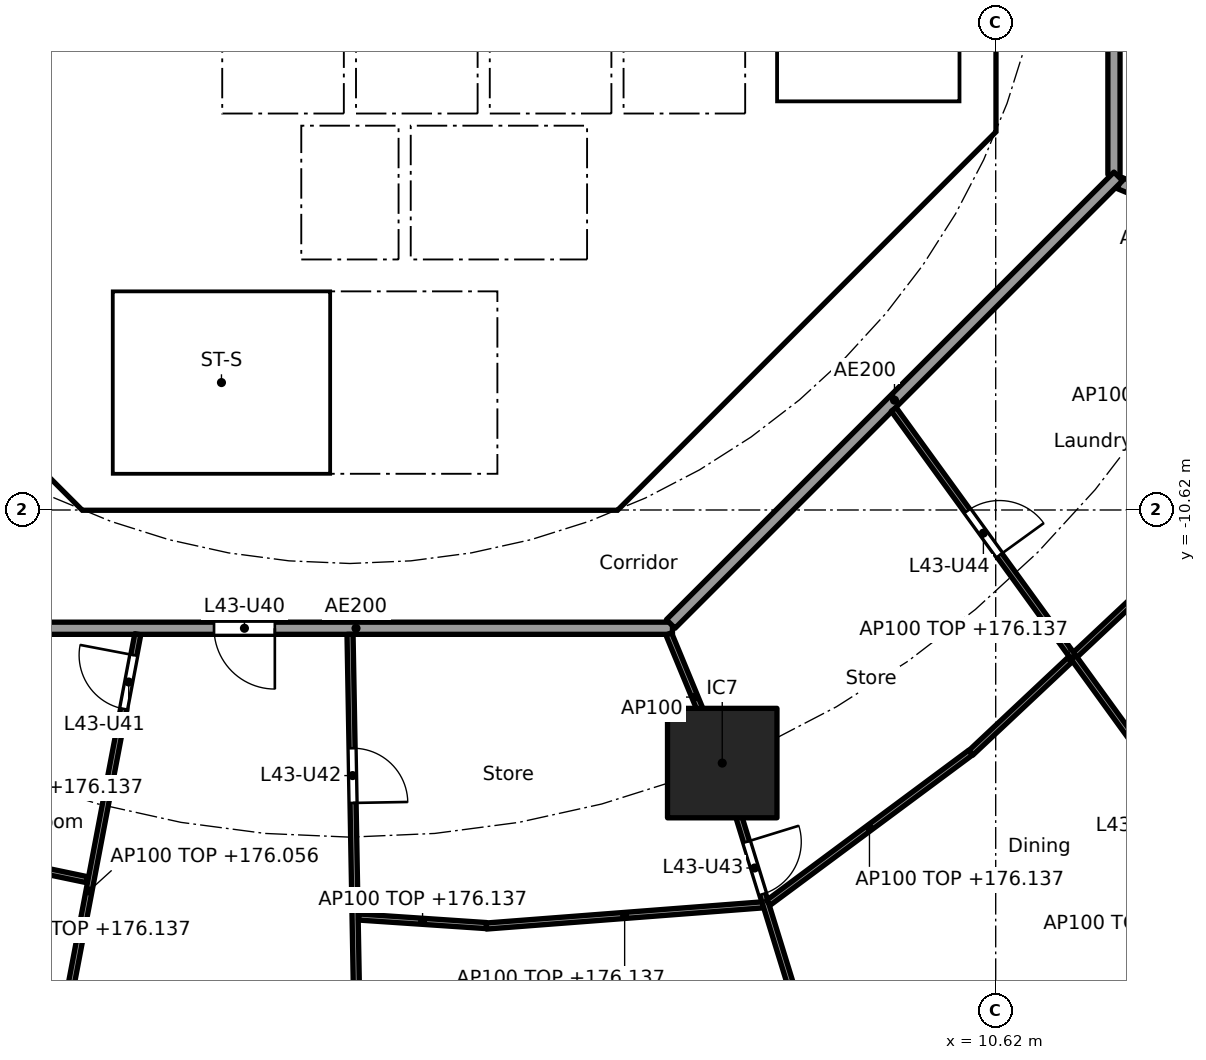
"""IFC4 building model, lengths in metres.
Left out: names, types, materials, properties, quantities, classifications, styles, units other than length and angle.
Written with IfcOpenShell. Run it as: python <this file> out.ifc"""

import sys

from ifc_helpers import new_model, si_unit, direction, frame, frame_2d, origin, origin_2d, place, context, subcontext, project, spatial, polyline, rectangle, outline, extrude, element, fill, save


model = new_model("IFC4")
c1 = context("Model", 3, precision=1e-05, world=origin(), true_north=direction((0.0, 1.0)))
c2 = subcontext(c1, "Body", "Model", "MODEL_VIEW")
j1 = project(units=[si_unit("LENGTHUNIT", "METRE"), si_unit("PLANEANGLEUNIT", "RADIAN")], contexts=[c1])
p1 = place(None, origin())
s1 = spatial("IfcSite", under=j1, at=p1, CompositionType="ELEMENT")
p2 = place(p1, origin())
s2 = spatial("IfcBuilding", under=s1, at=p2, CompositionType="ELEMENT")
p3 = place(p2, frame((0.0, 0.0, 173.3)))
s3 = spatial("IfcBuildingStorey", under=s2, at=p3, CompositionType="ELEMENT", Elevation=173.3)
p4 = place(p3, frame((6.123, -14.782, 0.0), z_axis=(0.0, 0.0, 1.0), x_axis=(1.0, 0.0, 0.0)))
e1 = element("IfcColumn", 1, at=p4, inside=s3, PredefinedType="COLUMN", context=c2, shape_type="SweptSolid", body=[
    extrude(rectangle(XDim=1.8, YDim=1.8, at=origin_2d()), origin(), (0.0, 0.0, 1.0), 3.7),
])
p5 = place(p3, frame((-9.988, -4.613, 0.0), z_axis=(0.0, 0.0, 1.0), x_axis=(0.707106781187, -0.707106781187, 0.0)))
e2 = element("IfcWall", 2, at=p5, inside=s3, PredefinedType="SHEAR", context=c2, shape_type="SweptSolid", body=[
    extrude(rectangle(XDim=7.602, YDim=0.6, at=frame_2d((3.801, 0.0))), origin(), (0.0, 0.0, 1.0), 3.44),
])
p6 = place(p5, frame((6.151, 0.0, 0.0)))
e3 = element("IfcOpeningElement", 3, at=p6, cuts=e2, PredefinedType="OPENING", context=c2, shape_type="SweptSolid", body=[
    extrude(rectangle(XDim=1.1, YDim=2.1, at=frame_2d((0.55, 1.05))), frame((0.0, 0.31, 0.0), z_axis=(0.0, -1.0, 0.0), x_axis=(1.0, 0.0, 0.0)), (0.0, 0.0, 1.0), 0.62),
])
p7 = place(p3, frame((4.613, -9.988, 0.0), z_axis=(0.0, 0.0, 1.0), x_axis=(0.707106781187, 0.707106781187, 0.0)))
e4 = element("IfcWall", 4, at=p7, inside=s3, PredefinedType="SHEAR", context=c2, shape_type="SweptSolid", body=[
    extrude(rectangle(XDim=7.602, YDim=0.6, at=frame_2d((3.801, 0.0))), origin(), (0.0, 0.0, 1.0), 3.44),
])
p8 = place(p7, frame((3.201, 0.0, 0.0)))
e5 = element("IfcOpeningElement", 5, at=p8, cuts=e4, PredefinedType="OPENING", context=c2, shape_type="SweptSolid", body=[
    extrude(rectangle(XDim=1.2, YDim=2.1, at=frame_2d((0.6, 1.05))), frame((0.0, 0.31, 0.0), z_axis=(0.0, -1.0, 0.0), x_axis=(1.0, 0.0, 0.0)), (0.0, 0.0, 1.0), 0.62),
])
p9 = place(p3, frame((4.0, -10.025, 0.0), z_axis=(0.0, 0.0, 1.0), x_axis=(0.0, 1.0, 0.0)))
e6 = element("IfcWall", 6, at=p9, inside=s3, PredefinedType="SOLIDWALL", context=c2, shape_type="SweptSolid", body=[
    extrude(rectangle(XDim=3.0, YDim=0.2, at=frame_2d((1.5, 0.0))), origin(), (0.0, 0.0, 1.0), 3.44),
])
p10 = place(p9, frame((0.975, 0.0, 0.0)))
e7 = element("IfcOpeningElement", 7, at=p10, cuts=e6, PredefinedType="OPENING", context=c2, shape_type="SweptSolid", body=[
    extrude(rectangle(XDim=1.1, YDim=2.1, at=frame_2d((0.55, 1.05))), frame((0.0, 0.11, 0.0), z_axis=(0.0, -1.0, 0.0), x_axis=(1.0, 0.0, 0.0)), (0.0, 0.0, 1.0), 0.22),
])
p11 = place(p3, frame((4.0, -6.5, 0.0), z_axis=(0.0, 0.0, 1.0), x_axis=(0.0, 1.0, 0.0)))
e8 = element("IfcWall", 8, at=p11, inside=s3, PredefinedType="SOLIDWALL", context=c2, shape_type="SweptSolid", body=[
    extrude(rectangle(XDim=2.2, YDim=0.2, at=frame_2d((1.1, 0.0))), origin(), (0.0, 0.0, 1.0), 3.44),
])
p12 = place(p11, frame((0.55, 0.0, 0.0)))
e9 = element("IfcOpeningElement", 9, at=p12, cuts=e8, PredefinedType="OPENING", context=c2, shape_type="SweptSolid", body=[
    extrude(rectangle(XDim=1.1, YDim=2.1, at=frame_2d((0.55, 1.05))), frame((0.0, 0.11, 0.0), z_axis=(0.0, -1.0, 0.0), x_axis=(1.0, 0.0, 0.0)), (0.0, 0.0, 1.0), 0.22),
])
p13 = place(p3, frame((-4.0, -6.5, 0.0), z_axis=(0.0, 0.0, 1.0), x_axis=(0.0, 1.0, 0.0)))
e10 = element("IfcWall", 10, at=p13, inside=s3, PredefinedType="SOLIDWALL", context=c2, shape_type="SweptSolid", body=[
    extrude(rectangle(XDim=2.2, YDim=0.2, at=frame_2d((1.1, 0.0))), origin(), (0.0, 0.0, 1.0), 3.44),
])
p14 = place(p13, frame((0.65, 0.0, 0.0)))
e11 = element("IfcOpeningElement", 11, at=p14, cuts=e10, PredefinedType="OPENING", context=c2, shape_type="SweptSolid", body=[
    extrude(rectangle(XDim=0.9, YDim=2.1, at=frame_2d((0.45, 1.05))), frame((0.0, 0.11, 0.0), z_axis=(0.0, -1.0, 0.0), x_axis=(1.0, 0.0, 0.0)), (0.0, 0.0, 1.0), 0.22),
])
p15 = place(p3, origin())
e12 = element("IfcWall", 12, at=p15, inside=s3, PredefinedType="SHEAR", context=c2, shape_type="SweptSolid", body=[
    extrude(outline(polyline([(-4.152, -10.025), (4.152, -10.025), (4.401, -9.776), (4.825, -10.2), (4.401, -10.625), (-4.401, -10.625), (-4.825, -10.2), (-4.401, -9.776), (-4.152, -10.025)])), origin(), (0.0, 0.0, 1.0), 3.44),
])
p16 = place(p3, origin())
e13 = element("IfcWall", 13, at=p16, inside=s3, PredefinedType="SHEAR", context=c2, shape_type="SweptSolid", body=[
    extrude(outline(polyline([(9.776, -4.401), (10.025, -4.152), (10.025, -3.801), (10.025, 4.152), (9.776, 4.401), (10.2, 4.825), (10.625, 4.401), (10.625, -4.401), (10.2, -4.825), (9.776, -4.401)])), origin(), (0.0, 0.0, 1.0), 3.44),
])
for number, where, z_axis, x_axis in (
    (14, (-0.9, -6.5, 0.0), (0.0, 0.0, 1.0), (0.0, 1.0, 0.0)),
    (15, (0.9, -6.5, 0.0), (0.0, 0.0, 1.0), (0.0, 1.0, 0.0)),
):
    element("IfcWall", number, at=place(p3, frame(where, z_axis=z_axis, x_axis=x_axis)), inside=s3, PredefinedType="SOLIDWALL", context=c2, shape_type="SweptSolid", body=[
        extrude(rectangle(XDim=2.2, YDim=0.2, at=frame_2d((1.1, 0.0))), origin(), (0.0, 0.0, 1.0), 3.44),
    ])
p17 = place(p3, origin())
e16 = element("IfcWall", 16, at=p17, inside=s3, PredefinedType="SOLIDWALL", context=c2, shape_type="SweptSolid", body=[
    extrude(outline(polyline([(-6.7, -2.1), (-6.5, -2.1), (-6.5, -4.1), (-2.3, -4.1), (-2.3, -2.1), (-2.1, -2.1), (-2.1, -4.1), (-0.1, -4.1), (-0.1, -2.1), (0.1, -2.1), (0.1, -4.1), (2.1, -4.1), (2.1, -2.1), (2.3, -2.1), (2.3, -4.1), (4.3, -4.1), (4.3, -2.1), (4.5, -2.1), (4.5, -4.1), (6.5, -4.1), (6.5, -2.1), (6.7, -2.1), (6.7, -4.3), (-6.7, -4.3), (-6.7, -2.1)])), origin(), (0.0, 0.0, 1.0), 3.44),
])
p18 = place(p3, origin())
e17 = element("IfcWall", 17, at=p18, inside=s3, PredefinedType="SOLIDWALL", context=c2, shape_type="SweptSolid", body=[
    extrude(outline(polyline([(-3.9, -10.025), (-4.1, -10.025), (-4.1, -7.025), (-3.9, -7.025), (-3.9, -10.025)])), origin(), (0.0, 0.0, 1.0), 3.44),
])
p19 = place(p3, origin())
e18 = element("IfcWall", 18, at=p19, inside=s3, PredefinedType="SOLIDWALL", context=c2, shape_type="SweptSolid", body=[
    extrude(outline(polyline([(4.1, -7.025), (-4.1, -7.025), (-4.1, -6.5), (4.1, -6.5), (4.1, -7.025)])), origin(), (0.0, 0.0, 1.0), 3.44),
])
p20 = place(p3, origin())
e19 = element("IfcWall", 19, at=p20, inside=s3, PredefinedType="SOLIDWALL", context=c2, shape_type="SweptSolid", body=[
    extrude(outline(polyline([(7.025, -3.9), (6.7, -3.9), (6.7, 3.9), (7.025, 3.9), (7.025, -3.9)])), origin(), (0.0, 0.0, 1.0), 3.44),
])
p21 = place(p3, origin())
e20 = element("IfcWall", 20, at=p21, inside=s3, PredefinedType="SOLIDWALL", context=c2, shape_type="SweptSolid", body=[
    extrude(outline(polyline([(10.025, -4.1), (6.7, -4.1), (6.7, -3.9), (10.025, -3.9), (10.025, -4.1)])), origin(), (0.0, 0.0, 1.0), 3.44),
])
p22 = place(p3, frame((12.657, -5.243, 0.0), z_axis=(0.0, 0.0, 1.0), x_axis=(0.92383017907, -0.382802560388, 0.0)))
e21 = element("IfcWall", 21, at=p22, inside=s3, PredefinedType="PARTITIONING", context=c2, shape_type="SweptSolid", body=[
    extrude(rectangle(XDim=2.2, YDim=0.2, at=frame_2d((1.1, 0.0))), origin(), (0.0, 0.0, 1.0), 3.44),
])
p23 = place(p3, frame((12.565, -5.104, 0.0), z_axis=(0.0, 0.0, 1.0), x_axis=(0.0, 1.0, 0.0)))
e22 = element("IfcWall", 22, at=p23, inside=s3, PredefinedType="PARTITIONING", context=c2, shape_type="SweptSolid", body=[
    extrude(rectangle(XDim=10.209, YDim=0.2, at=frame_2d((5.104, 0.0))), origin(), (0.0, 0.0, 1.0), 3.44),
])
p24 = place(p23, frame((5.906, 0.0, 0.0)))
e23 = element("IfcOpeningElement", 23, at=p24, cuts=e22, PredefinedType="OPENING", context=c2, shape_type="SweptSolid", body=[
    extrude(rectangle(XDim=1.0, YDim=2.1, at=frame_2d((0.5, 1.05))), frame((0.0, 0.11, 0.0), z_axis=(0.0, -1.0, 0.0), x_axis=(1.0, 0.0, 0.0)), (0.0, 0.0, 1.0), 0.22),
])
p25 = place(p3, frame((-5.104, -12.565, 0.0), z_axis=(0.0, 0.0, 1.0), x_axis=(1.0, 0.0, 0.0)))
e24 = element("IfcWall", 24, at=p25, inside=s3, PredefinedType="PARTITIONING", context=c2, shape_type="SweptSolid", body=[
    extrude(rectangle(XDim=10.409, YDim=0.2, at=frame_2d((5.205, 0.0))), origin(), (0.0, 0.0, 1.0), 3.44),
])
p26 = place(p25, frame((2.87, 0.0, 0.0)))
e25 = element("IfcOpeningElement", 25, at=p26, cuts=e24, PredefinedType="OPENING", context=c2, shape_type="SweptSolid", body=[
    extrude(rectangle(XDim=1.0, YDim=2.1, at=frame_2d((0.5, 1.05))), frame((0.0, 0.11, 0.0), z_axis=(0.0, -1.0, 0.0), x_axis=(1.0, 0.0, 0.0)), (0.0, 0.0, 1.0), 0.22),
])
p27 = place(p3, frame((5.275, -12.494, 0.0), z_axis=(0.0, 0.0, 1.0), x_axis=(0.707106781187, 0.707106781187, 0.0)))
e26 = element("IfcWall", 26, at=p27, inside=s3, PredefinedType="PARTITIONING", context=c2, shape_type="SweptSolid", body=[
    extrude(rectangle(XDim=10.409, YDim=0.2, at=frame_2d((5.205, 0.0))), origin(), (0.0, 0.0, 1.0), 3.44),
])
p28 = place(p3, frame((-6.447, -16.256, 0.0), z_axis=(0.0, 0.0, 1.0), x_axis=(0.978909151576, -0.204296042448, 0.0)))
e27 = element("IfcWall", 27, at=p28, inside=s3, PredefinedType="PARTITIONING", context=c2, shape_type="SweptSolid", body=[
    extrude(rectangle(XDim=2.168, YDim=0.1, at=frame_2d((1.084, 0.0))), origin(), (0.0, 0.0, 1.0), 2.837),
])
p29 = place(p3, frame((-3.488, -12.663, 0.0), z_axis=(0.0, 0.0, 1.0), x_axis=(-0.186783185485, -0.982401161247, 0.0)))
e28 = element("IfcWall", 28, at=p29, inside=s3, PredefinedType="PARTITIONING", context=c2, shape_type="SweptSolid", body=[
    extrude(rectangle(XDim=8.595, YDim=0.1, at=frame_2d((4.298, 0.0))), origin(), (0.0, 0.0, 1.0), 2.756),
])
p30 = place(p29, frame((0.35, 0.0, 0.0)))
e29 = element("IfcOpeningElement", 29, at=p30, cuts=e28, PredefinedType="OPENING", context=c2, shape_type="SweptSolid", body=[
    extrude(rectangle(XDim=0.9, YDim=2.1, at=frame_2d((0.45, 1.05))), frame((0.0, 0.06, 0.0), z_axis=(0.0, -1.0, 0.0), x_axis=(1.0, 0.0, 0.0)), (0.0, 0.0, 1.0), 0.12),
])
p31 = place(p29, frame((5.908, 0.0, 0.0)))
e30 = element("IfcOpeningElement", 30, at=p31, cuts=e28, PredefinedType="OPENING", context=c2, shape_type="SweptSolid", body=[
    extrude(rectangle(XDim=0.9, YDim=2.1, at=frame_2d((0.45, 1.05))), frame((0.0, 0.06, 0.0), z_axis=(0.0, -1.0, 0.0), x_axis=(1.0, 0.0, 0.0)), (0.0, 0.0, 1.0), 0.12),
])
p32 = place(p3, frame((0.002, -12.665, 0.0), z_axis=(0.0, 0.0, 1.0), x_axis=(0.01792079652, -0.999839409631, 0.0)))
e31 = element("IfcWall", 31, at=p32, inside=s3, PredefinedType="PARTITIONING", context=c2, shape_type="SweptSolid", body=[
    extrude(rectangle(XDim=15.926, YDim=0.1, at=frame_2d((7.963, 0.0))), origin(), (0.0, 0.0, 1.0), 2.756),
])
p33 = place(p32, frame((1.873, 0.0, 0.0)))
e32 = element("IfcOpeningElement", 32, at=p33, cuts=e31, PredefinedType="OPENING", context=c2, shape_type="SweptSolid", body=[
    extrude(rectangle(XDim=0.9, YDim=2.1, at=frame_2d((0.45, 1.05))), frame((0.0, 0.06, 0.0), z_axis=(0.0, -1.0, 0.0), x_axis=(1.0, 0.0, 0.0)), (0.0, 0.0, 1.0), 0.12),
])
p34 = place(p32, frame((6.728, 0.0, 0.0)))
e33 = element("IfcOpeningElement", 33, at=p34, cuts=e31, PredefinedType="OPENING", context=c2, shape_type="SweptSolid", body=[
    extrude(rectangle(XDim=0.9, YDim=2.1, at=frame_2d((0.45, 1.05))), frame((0.0, 0.06, 0.0), z_axis=(0.0, -1.0, 0.0), x_axis=(1.0, 0.0, 0.0)), (0.0, 0.0, 1.0), 0.12),
])
p35 = place(p3, frame((0.145, -17.314, 0.0), z_axis=(0.0, 0.0, 1.0), x_axis=(0.997756833447, -0.06694252243, 0.0)))
e34 = element("IfcWall", 34, at=p35, inside=s3, PredefinedType="PARTITIONING", context=c2, shape_type="SweptSolid", body=[
    extrude(rectangle(XDim=2.104, YDim=0.1, at=frame_2d((1.052, 0.0))), origin(), (0.0, 0.0, 1.0), 2.837),
])
p36 = place(p3, frame((2.245, -17.462, 0.0), z_axis=(0.0, 0.0, 1.0), x_axis=(0.997077117727, 0.07640171009, 0.0)))
e35 = element("IfcWall", 35, at=p36, inside=s3, PredefinedType="PARTITIONING", context=c2, shape_type="SweptSolid", body=[
    extrude(rectangle(XDim=4.56, YDim=0.1, at=frame_2d((2.28, 0.0))), origin(), (0.0, 0.0, 1.0), 2.837),
])
p37 = place(p3, frame((5.243, -12.657, 0.0), z_axis=(0.0, 0.0, 1.0), x_axis=(0.382719158442, -0.923864733477, 0.0)))
e36 = element("IfcWall", 36, at=p37, inside=s3, PredefinedType="PARTITIONING", context=c2, shape_type="SweptSolid", body=[
    extrude(rectangle(XDim=2.25, YDim=0.1, at=frame_2d((1.125, 0.0))), origin(), (0.0, 0.0, 1.0), 3.44),
])
p38 = place(p3, frame((6.138, -14.83, 0.0), z_axis=(0.0, 0.0, 1.0), x_axis=(0.294818517221, -0.955553264818, 0.0)))
e37 = element("IfcWall", 37, at=p38, inside=s3, PredefinedType="PARTITIONING", context=c2, shape_type="SweptSolid", body=[
    extrude(rectangle(XDim=12.619, YDim=0.1, at=frame_2d((6.31, 0.0))), origin(), (0.0, 0.0, 1.0), 2.837),
])
p39 = place(p38, frame((1.306, 0.0, 0.0)))
e38 = element("IfcOpeningElement", 38, at=p39, cuts=e37, PredefinedType="OPENING", context=c2, shape_type="SweptSolid", body=[
    extrude(rectangle(XDim=0.9, YDim=2.1, at=frame_2d((0.45, 1.05))), frame((0.0, 0.06, 0.0), z_axis=(0.0, -1.0, 0.0), x_axis=(1.0, 0.0, 0.0)), (0.0, 0.0, 1.0), 0.12),
])
p40 = place(p38, frame((4.515, 0.0, 0.0)))
e39 = element("IfcOpeningElement", 39, at=p40, cuts=e37, PredefinedType="OPENING", context=c2, shape_type="SweptSolid", body=[
    extrude(rectangle(XDim=0.9, YDim=2.1, at=frame_2d((0.45, 1.05))), frame((0.0, 0.06, 0.0), z_axis=(0.0, -1.0, 0.0), x_axis=(1.0, 0.0, 0.0)), (0.0, 0.0, 1.0), 0.12),
])
p41 = place(p38, frame((9.632, 0.0, 0.0)))
e40 = element("IfcOpeningElement", 40, at=p41, cuts=e37, PredefinedType="OPENING", context=c2, shape_type="SweptSolid", body=[
    extrude(rectangle(XDim=0.9, YDim=2.1, at=frame_2d((0.45, 1.05))), frame((0.0, 0.06, 0.0), z_axis=(0.0, -1.0, 0.0), x_axis=(1.0, 0.0, 0.0)), (0.0, 0.0, 1.0), 0.12),
])
p42 = place(p3, frame((6.881, -17.08, 0.0), z_axis=(0.0, 0.0, 1.0), x_axis=(0.802784956441, 0.596268659005, 0.0)))
e41 = element("IfcWall", 41, at=p42, inside=s3, PredefinedType="PARTITIONING", context=c2, shape_type="SweptSolid", body=[
    extrude(rectangle(XDim=4.142, YDim=0.1, at=frame_2d((2.071, 0.0))), origin(), (0.0, 0.0, 1.0), 2.837),
])
p43 = place(p3, frame((10.21, -14.614, 0.0), z_axis=(0.0, 0.0, 1.0), x_axis=(0.728883199496, 0.684638066055, 0.0)))
e42 = element("IfcWall", 42, at=p43, inside=s3, PredefinedType="PARTITIONING", context=c2, shape_type="SweptSolid", body=[
    extrude(rectangle(XDim=4.519, YDim=0.1, at=frame_2d((2.26, 0.0))), origin(), (0.0, 0.0, 1.0), 2.837),
])
p44 = place(p3, frame((8.943, -8.966, 0.0), z_axis=(0.0, 0.0, 1.0), x_axis=(0.586803608919, -0.809729290912, 0.0)))
e43 = element("IfcWall", 43, at=p44, inside=s3, PredefinedType="PARTITIONING", context=c2, shape_type="SweptSolid", body=[
    extrude(rectangle(XDim=17.179, YDim=0.1, at=frame_2d((8.589, 0.0))), origin(), (0.0, 0.0, 1.0), 2.756),
])
p45 = place(p44, frame((2.062, 0.0, 0.0)))
e44 = element("IfcOpeningElement", 44, at=p45, cuts=e43, PredefinedType="OPENING", context=c2, shape_type="SweptSolid", body=[
    extrude(rectangle(XDim=0.9, YDim=2.1, at=frame_2d((0.45, 1.05))), frame((0.0, 0.06, 0.0), z_axis=(0.0, -1.0, 0.0), x_axis=(1.0, 0.0, 0.0)), (0.0, 0.0, 1.0), 0.12),
])
p46 = place(p44, frame((7.308, 0.0, 0.0)))
e45 = element("IfcOpeningElement", 45, at=p46, cuts=e43, PredefinedType="OPENING", context=c2, shape_type="SweptSolid", body=[
    extrude(rectangle(XDim=0.9, YDim=2.1, at=frame_2d((0.45, 1.05))), frame((0.0, 0.06, 0.0), z_axis=(0.0, -1.0, 0.0), x_axis=(1.0, 0.0, 0.0)), (0.0, 0.0, 1.0), 0.12),
])
p47 = place(p12, origin())
e46 = element("IfcDoor", 46, at=p47, inside=s3, OperationType="DOUBLE_DOOR_SLIDING", PredefinedType="DOOR", context=c2, shape_type="SweptSolid", body=[
    extrude(rectangle(XDim=1.1, YDim=2.1, at=frame_2d((0.55, 1.05))), frame((0.0, 0.025, 0.0), z_axis=(0.0, -1.0, 0.0), x_axis=(1.0, 0.0, 0.0)), (0.0, 0.0, 1.0), 0.05),
])
fill(e9, e46)
p48 = place(p10, origin())
e47 = element("IfcDoor", 47, at=p48, inside=s3, OperationType="SINGLE_SWING_LEFT", PredefinedType="DOOR", context=c2, shape_type="SweptSolid", body=[
    extrude(rectangle(XDim=1.1, YDim=2.1, at=frame_2d((0.55, 1.05))), frame((0.0, 0.025, 0.0), z_axis=(0.0, -1.0, 0.0), x_axis=(1.0, 0.0, 0.0)), (0.0, 0.0, 1.0), 0.05),
])
fill(e7, e47)
p49 = place(p14, frame((0.9, 0.0, 0.0), x_axis=(-1.0, 0.0, 0.0)))
e48 = element("IfcDoor", 48, at=p49, inside=s3, OperationType="SINGLE_SWING_RIGHT", PredefinedType="DOOR", context=c2, shape_type="SweptSolid", body=[
    extrude(rectangle(XDim=0.9, YDim=2.1, at=frame_2d((0.45, 1.05))), frame((0.0, 0.025, 0.0), z_axis=(0.0, -1.0, 0.0), x_axis=(1.0, 0.0, 0.0)), (0.0, 0.0, 1.0), 0.05),
])
fill(e11, e48)
p50 = place(p8, origin())
e49 = element("IfcDoor", 49, at=p50, inside=s3, OperationType="SINGLE_SWING_RIGHT", PredefinedType="DOOR", context=c2, shape_type="SweptSolid", body=[
    extrude(rectangle(XDim=1.2, YDim=2.1, at=frame_2d((0.6, 1.05))), frame((0.0, 0.025, 0.0), z_axis=(0.0, -1.0, 0.0), x_axis=(1.0, 0.0, 0.0)), (0.0, 0.0, 1.0), 0.05),
])
fill(e5, e49)
p51 = place(p6, origin())
e50 = element("IfcDoor", 50, at=p51, inside=s3, OperationType="SINGLE_SWING_RIGHT", PredefinedType="DOOR", context=c2, shape_type="SweptSolid", body=[
    extrude(rectangle(XDim=1.1, YDim=2.1, at=frame_2d((0.55, 1.05))), frame((0.0, 0.025, 0.0), z_axis=(0.0, -1.0, 0.0), x_axis=(1.0, 0.0, 0.0)), (0.0, 0.0, 1.0), 0.05),
])
fill(e3, e50)
p52 = place(p26, frame((1.0, 0.0, 0.0), x_axis=(-1.0, 0.0, 0.0)))
e51 = element("IfcDoor", 51, at=p52, inside=s3, OperationType="SINGLE_SWING_LEFT", PredefinedType="DOOR", context=c2, shape_type="SweptSolid", body=[
    extrude(rectangle(XDim=1.0, YDim=2.1, at=frame_2d((0.5, 1.05))), frame((0.0, 0.025, 0.0), z_axis=(0.0, -1.0, 0.0), x_axis=(1.0, 0.0, 0.0)), (0.0, 0.0, 1.0), 0.05),
])
fill(e25, e51)
p53 = place(p30, frame((0.9, 0.0, 0.0), x_axis=(-1.0, 0.0, 0.0)))
e52 = element("IfcDoor", 52, at=p53, inside=s3, OperationType="SINGLE_SWING_RIGHT", PredefinedType="DOOR", context=c2, shape_type="SweptSolid", body=[
    extrude(rectangle(XDim=0.9, YDim=2.1, at=frame_2d((0.45, 1.05))), frame((0.0, 0.025, 0.0), z_axis=(0.0, -1.0, 0.0), x_axis=(1.0, 0.0, 0.0)), (0.0, 0.0, 1.0), 0.05),
])
fill(e29, e52)
p54 = place(p33, origin())
e53 = element("IfcDoor", 53, at=p54, inside=s3, OperationType="SINGLE_SWING_RIGHT", PredefinedType="DOOR", context=c2, shape_type="SweptSolid", body=[
    extrude(rectangle(XDim=0.9, YDim=2.1, at=frame_2d((0.45, 1.05))), frame((0.0, 0.025, 0.0), z_axis=(0.0, -1.0, 0.0), x_axis=(1.0, 0.0, 0.0)), (0.0, 0.0, 1.0), 0.05),
])
fill(e32, e53)
p55 = place(p39, origin())
e54 = element("IfcDoor", 54, at=p55, inside=s3, OperationType="SINGLE_SWING_LEFT", PredefinedType="DOOR", context=c2, shape_type="SweptSolid", body=[
    extrude(rectangle(XDim=0.9, YDim=2.1, at=frame_2d((0.45, 1.05))), frame((0.0, 0.025, 0.0), z_axis=(0.0, -1.0, 0.0), x_axis=(1.0, 0.0, 0.0)), (0.0, 0.0, 1.0), 0.05),
])
fill(e38, e54)
p56 = place(p45, origin())
e55 = element("IfcDoor", 55, at=p56, inside=s3, OperationType="SINGLE_SWING_RIGHT", PredefinedType="DOOR", context=c2, shape_type="SweptSolid", body=[
    extrude(rectangle(XDim=0.9, YDim=2.1, at=frame_2d((0.45, 1.05))), frame((0.0, 0.025, 0.0), z_axis=(0.0, -1.0, 0.0), x_axis=(1.0, 0.0, 0.0)), (0.0, 0.0, 1.0), 0.05),
])
fill(e44, e55)
save(model, sys.argv[1])
